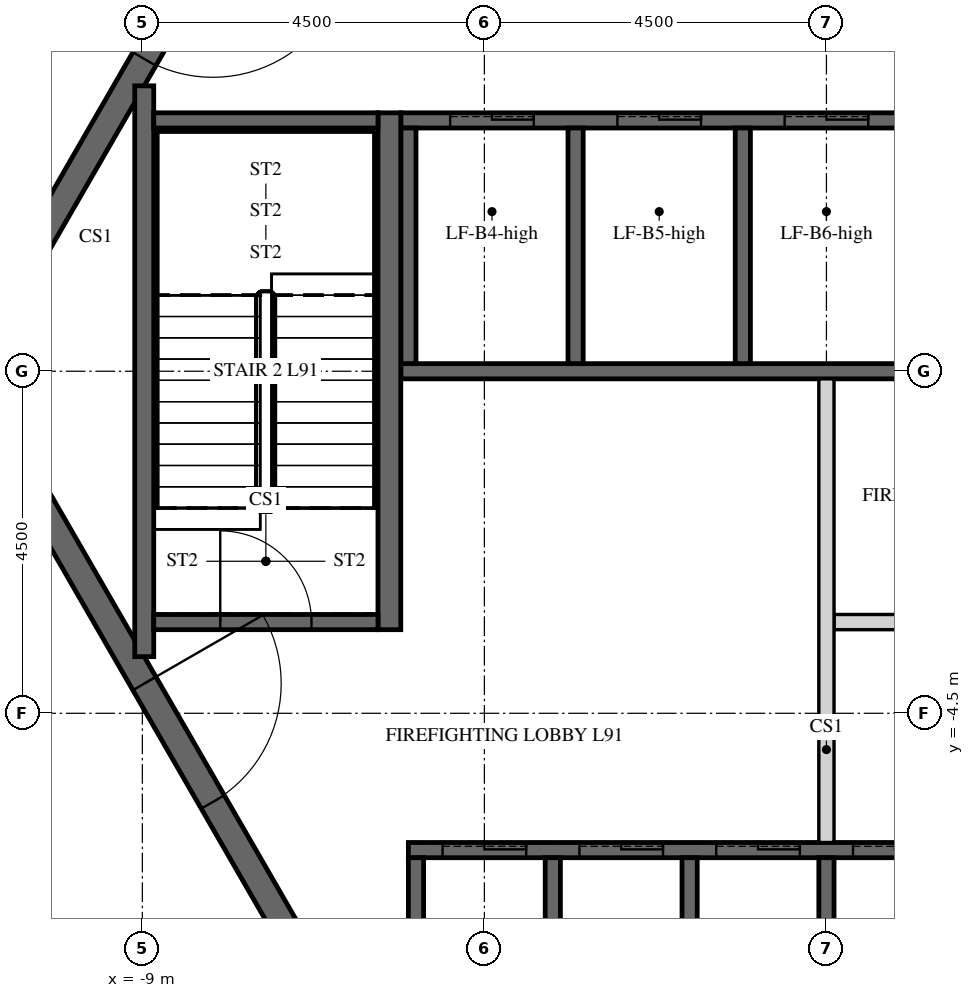
"""IFC4 building model, lengths in metres.
Left out: names, types, materials, properties, quantities, classifications, styles, units other than length and angle.
Written with IfcOpenShell. Run it as: python <this file> out.ifc"""

import sys

from ifc_helpers import new_model, si_unit, direction, frame, frame_2d, origin, place, context, subcontext, project, spatial, polyline, rectangle, outline, extrude, element, fill, save


model = new_model("IFC4")
c1 = context("Model", 3, precision=1e-05, world=origin(), true_north=direction((0.0, 1.0)))
c2 = subcontext(c1, "Body", "Model", "MODEL_VIEW")
j1 = project(units=[si_unit("LENGTHUNIT", "METRE"), si_unit("PLANEANGLEUNIT", "RADIAN")], contexts=[c1])
p1 = place(None, origin())
s1 = spatial("IfcSite", under=j1, at=p1, CompositionType="ELEMENT")
p2 = place(p1, origin())
s2 = spatial("IfcBuilding", under=s1, at=p2, CompositionType="ELEMENT")
p3 = place(p2, frame((0.0, 0.0, 376.8)))
s3 = spatial("IfcBuildingStorey", under=s2, at=p3, CompositionType="ELEMENT", Elevation=376.8)
p4 = place(p3, frame((-5.673, 9.825, -0.5), z_axis=(0.0, 0.0, 1.0), x_axis=(-0.499995046907, -0.866028263435, 0.0)))
e1 = element("IfcWall", 1, at=p4, inside=s3, PredefinedType="SHEAR", context=c2, shape_type="SweptSolid", body=[
    extrude(outline(polyline([(-0.101, -0.175), (11.446, -0.175), (11.244, 0.175), (0.101, 0.175), (-0.101, -0.175)])), origin(), (0.0, 0.0, 1.0), 11.7),
])
p5 = place(p4, frame((4.801, 0.0, 0.5)))
e2 = element("IfcOpeningElement", 2, at=p5, cuts=e1, PredefinedType="OPENING", context=c2, shape_type="SweptSolid", body=[
    extrude(rectangle(XDim=1.8, YDim=2.4, at=frame_2d((0.9, 1.2))), frame((0.0, 0.185, 0.0), z_axis=(0.0, -1.0, 0.0), x_axis=(1.0, 0.0, 0.0)), (0.0, 0.0, 1.0), 0.37),
])
p6 = place(p3, frame((-11.345, 0.0, -0.5), z_axis=(0.0, 0.0, 1.0), x_axis=(0.499995046907, -0.866028263435, 0.0)))
e3 = element("IfcWall", 3, at=p6, inside=s3, PredefinedType="SHEAR", context=c2, shape_type="SweptSolid", body=[
    extrude(outline(polyline([(-0.101, -0.175), (11.446, -0.175), (11.244, 0.175), (0.101, 0.175), (-0.101, -0.175)])), origin(), (0.0, 0.0, 1.0), 11.7),
])
p7 = place(p6, frame((4.744, 0.0, 0.5)))
e4 = element("IfcOpeningElement", 4, at=p7, cuts=e3, PredefinedType="OPENING", context=c2, shape_type="SweptSolid", body=[
    extrude(rectangle(XDim=1.8, YDim=2.4, at=frame_2d((0.9, 1.2))), frame((0.0, 0.185, 0.0), z_axis=(0.0, -1.0, 0.0), x_axis=(1.0, 0.0, 0.0)), (0.0, 0.0, 1.0), 0.37),
])
p8 = place(p3, frame((-5.6, 3.3, -0.25), z_axis=(0.0, 0.0, 1.0), x_axis=(1.0, 0.0, 0.0)))
e5 = element("IfcWall", 5, at=p8, inside=s3, PredefinedType="SHEAR", context=c2, shape_type="SweptSolid", body=[
    extrude(rectangle(XDim=11.2, YDim=0.2, at=frame_2d((5.6, 0.0))), origin(), (0.0, 0.0, 1.0), 11.45),
])
p9 = place(p8, frame((8.45, 0.0, 0.25)))
e6 = element("IfcOpeningElement", 6, at=p9, cuts=e5, PredefinedType="OPENING", context=c2, shape_type="SweptSolid", body=[
    extrude(rectangle(XDim=0.9, YDim=2.1, at=frame_2d((0.45, 1.05))), frame((0.0, 0.11, 0.0), z_axis=(0.0, -1.0, 0.0), x_axis=(1.0, 0.0, 0.0)), (0.0, 0.0, 1.0), 0.22),
])
p10 = place(p8, frame((0.65, 0.0, 0.25)))
e7 = element("IfcOpeningElement", 7, at=p10, cuts=e5, PredefinedType="OPENING", context=c2, shape_type="SweptSolid", body=[
    extrude(rectangle(XDim=1.1, YDim=2.1, at=frame_2d((0.55, 1.05))), frame((0.0, 0.11, 0.0), z_axis=(0.0, -1.0, 0.0), x_axis=(1.0, 0.0, 0.0)), (0.0, 0.0, 1.0), 0.22),
])
p11 = place(p8, frame((2.85, 0.0, 0.25)))
e8 = element("IfcOpeningElement", 8, at=p11, cuts=e5, PredefinedType="OPENING", context=c2, shape_type="SweptSolid", body=[
    extrude(rectangle(XDim=1.1, YDim=2.1, at=frame_2d((0.55, 1.05))), frame((0.0, 0.11, 0.0), z_axis=(0.0, -1.0, 0.0), x_axis=(1.0, 0.0, 0.0)), (0.0, 0.0, 1.0), 0.22),
])
p12 = place(p8, frame((5.05, 0.0, 0.25)))
e9 = element("IfcOpeningElement", 9, at=p12, cuts=e5, PredefinedType="OPENING", context=c2, shape_type="SweptSolid", body=[
    extrude(rectangle(XDim=1.1, YDim=2.1, at=frame_2d((0.55, 1.05))), frame((0.0, 0.11, 0.0), z_axis=(0.0, -1.0, 0.0), x_axis=(1.0, 0.0, 0.0)), (0.0, 0.0, 1.0), 0.22),
])
p13 = place(p3, frame((-5.6, 0.0, -0.25), z_axis=(0.0, 0.0, 1.0), x_axis=(1.0, 0.0, 0.0)))
e10 = element("IfcWall", 10, at=p13, inside=s3, PredefinedType="SHEAR", context=c2, shape_type="SweptSolid", body=[
    extrude(rectangle(XDim=11.2, YDim=0.2, at=frame_2d((5.6, 0.0))), origin(), (0.0, 0.0, 1.0), 11.45),
])
for number, where, z_axis, x_axis in (
    (11, (-5.5, 0.1, -0.25), (0.0, 0.0, 1.0), (0.0, 1.0, 0.0)),
    (12, (-3.3, 0.1, -0.25), (0.0, 0.0, 1.0), (0.0, 1.0, 0.0)),
    (13, (-1.1, 0.1, -0.25), (0.0, 0.0, 1.0), (0.0, 1.0, 0.0)),
):
    element("IfcWall", number, at=place(p3, frame(where, z_axis=z_axis, x_axis=x_axis)), inside=s3, PredefinedType="SHEAR", context=c2, shape_type="SweptSolid", body=[
        extrude(rectangle(XDim=3.1, YDim=0.2, at=frame_2d((1.55, 0.0))), origin(), (0.0, 0.0, 1.0), 11.45),
    ])
p14 = place(p3, frame((-5.5, -6.3, -0.25), z_axis=(0.0, 0.0, 1.0), x_axis=(1.0, 0.0, 0.0)))
e14 = element("IfcWall", 14, at=p14, inside=s3, PredefinedType="SHEAR", context=c2, shape_type="SweptSolid", body=[
    extrude(rectangle(XDim=9.2, YDim=0.2, at=frame_2d((4.6, 0.0))), origin(), (0.0, 0.0, 1.0), 11.45),
])
p15 = place(p14, frame((0.45, 0.0, 0.25)))
e15 = element("IfcOpeningElement", 15, at=p15, cuts=e14, PredefinedType="OPENING", context=c2, shape_type="SweptSolid", body=[
    extrude(rectangle(XDim=1.1, YDim=2.1, at=frame_2d((0.55, 1.05))), frame((0.0, 0.11, 0.0), z_axis=(0.0, -1.0, 0.0), x_axis=(1.0, 0.0, 0.0)), (0.0, 0.0, 1.0), 0.22),
])
p16 = place(p14, frame((2.25, 0.0, 0.25)))
e16 = element("IfcOpeningElement", 16, at=p16, cuts=e14, PredefinedType="OPENING", context=c2, shape_type="SweptSolid", body=[
    extrude(rectangle(XDim=1.1, YDim=2.1, at=frame_2d((0.55, 1.05))), frame((0.0, 0.11, 0.0), z_axis=(0.0, -1.0, 0.0), x_axis=(1.0, 0.0, 0.0)), (0.0, 0.0, 1.0), 0.22),
])
p17 = place(p14, frame((4.05, 0.0, 0.25)))
e17 = element("IfcOpeningElement", 17, at=p17, cuts=e14, PredefinedType="OPENING", context=c2, shape_type="SweptSolid", body=[
    extrude(rectangle(XDim=1.1, YDim=2.1, at=frame_2d((0.55, 1.05))), frame((0.0, 0.11, 0.0), z_axis=(0.0, -1.0, 0.0), x_axis=(1.0, 0.0, 0.0)), (0.0, 0.0, 1.0), 0.22),
])
p18 = place(p14, frame((5.85, 0.0, 0.25)))
e18 = element("IfcOpeningElement", 18, at=p18, cuts=e14, PredefinedType="OPENING", context=c2, shape_type="SweptSolid", body=[
    extrude(rectangle(XDim=1.1, YDim=2.1, at=frame_2d((0.55, 1.05))), frame((0.0, 0.11, 0.0), z_axis=(0.0, -1.0, 0.0), x_axis=(1.0, 0.0, 0.0)), (0.0, 0.0, 1.0), 0.22),
])
p19 = place(p14, frame((7.65, 0.0, 0.25)))
e19 = element("IfcOpeningElement", 19, at=p19, cuts=e14, PredefinedType="OPENING", context=c2, shape_type="SweptSolid", body=[
    extrude(rectangle(XDim=1.1, YDim=2.1, at=frame_2d((0.55, 1.05))), frame((0.0, 0.11, 0.0), z_axis=(0.0, -1.0, 0.0), x_axis=(1.0, 0.0, 0.0)), (0.0, 0.0, 1.0), 0.22),
])
for number, where, z_axis, x_axis in (
    (20, (-5.4, -9.3, -0.25), (0.0, 0.0, 1.0), (0.0, 1.0, 0.0)),
    (21, (-3.6, -9.3, -0.25), (0.0, 0.0, 1.0), (0.0, 1.0, 0.0)),
    (22, (-1.8, -9.3, -0.25), (0.0, 0.0, 1.0), (0.0, 1.0, 0.0)),
    (23, (0.0, -9.3, -0.25), (0.0, 0.0, 1.0), (0.0, 1.0, 0.0)),
):
    element("IfcWall", number, at=place(p3, frame(where, z_axis=z_axis, x_axis=x_axis)), inside=s3, PredefinedType="SHEAR", context=c2, shape_type="SweptSolid", body=[
        extrude(rectangle(XDim=2.9, YDim=0.2, at=frame_2d((1.45, 0.0))), origin(), (0.0, 0.0, 1.0), 11.45),
    ])
p20 = place(p3, frame((0.1, -3.3, 0.0), z_axis=(0.0, 0.0, 1.0), x_axis=(1.0, 0.0, 0.0)))
e24 = element("IfcWall", 24, at=p20, inside=s3, PredefinedType="PARTITIONING", context=c2, shape_type="SweptSolid", body=[
    extrude(rectangle(XDim=5.5, YDim=0.2, at=frame_2d((2.75, 0.0))), origin(), (0.0, 0.0, 1.0), 11.2),
])
p21 = place(p20, frame((2.3, 0.0, 0.0)))
e25 = element("IfcOpeningElement", 25, at=p21, cuts=e24, PredefinedType="OPENING", context=c2, shape_type="SweptSolid", body=[
    extrude(rectangle(XDim=0.9, YDim=2.1, at=frame_2d((0.45, 1.05))), frame((0.0, 0.11, 0.0), z_axis=(0.0, -1.0, 0.0), x_axis=(1.0, 0.0, 0.0)), (0.0, 0.0, 1.0), 0.22),
])
p22 = place(p3, frame((0.0, -6.2, 0.0), z_axis=(0.0, 0.0, 1.0), x_axis=(0.0, 1.0, 0.0)))
e26 = element("IfcWall", 26, at=p22, inside=s3, PredefinedType="PARTITIONING", context=c2, shape_type="SweptSolid", body=[
    extrude(rectangle(XDim=6.1, YDim=0.2, at=frame_2d((3.05, 0.0))), origin(), (0.0, 0.0, 1.0), 11.2),
])
p23 = place(p3, frame((-5.75, -3.4, -0.25), z_axis=(0.0, 0.0, 1.0), x_axis=(0.0, 1.0, 0.0)))
e27 = element("IfcWall", 27, at=p23, inside=s3, PredefinedType="SHEAR", context=c2, shape_type="SweptSolid", body=[
    extrude(rectangle(XDim=6.8, YDim=0.3, at=frame_2d((3.4, 0.0))), origin(), (0.0, 0.0, 1.0), 11.45),
])
p24 = place(p3, frame((-8.975, -3.755, -0.25), z_axis=(0.0, 0.0, 1.0), x_axis=(0.0, 1.0, 0.0)))
e28 = element("IfcWall", 28, at=p24, inside=s3, PredefinedType="SHEAR", context=c2, shape_type="SweptSolid", body=[
    extrude(rectangle(XDim=7.51, YDim=0.25, at=frame_2d((3.755, 0.0))), origin(), (0.0, 0.0, 1.0), 11.45),
])
p25 = place(p3, frame((-8.85, 3.3, -0.25), z_axis=(0.0, 0.0, 1.0), x_axis=(1.0, 0.0, 0.0)))
e29 = element("IfcWall", 29, at=p25, inside=s3, PredefinedType="SHEAR", context=c2, shape_type="SweptSolid", body=[
    extrude(rectangle(XDim=2.95, YDim=0.2, at=frame_2d((1.475, 0.0))), origin(), (0.0, 0.0, 1.0), 11.45),
])
p26 = place(p3, frame((-8.85, -3.3, -0.25), z_axis=(0.0, 0.0, 1.0), x_axis=(1.0, 0.0, 0.0)))
e30 = element("IfcWall", 30, at=p26, inside=s3, PredefinedType="SHEAR", context=c2, shape_type="SweptSolid", body=[
    extrude(rectangle(XDim=2.95, YDim=0.2, at=frame_2d((1.475, 0.0))), origin(), (0.0, 0.0, 1.0), 11.45),
])
p27 = place(p26, frame((0.875, 0.0, 0.25)))
e31 = element("IfcOpeningElement", 31, at=p27, cuts=e30, PredefinedType="OPENING", context=c2, shape_type="SweptSolid", body=[
    extrude(rectangle(XDim=1.2, YDim=2.4, at=frame_2d((0.6, 1.2))), frame((0.0, 0.11, 0.0), z_axis=(0.0, -1.0, 0.0), x_axis=(1.0, 0.0, 0.0)), (0.0, 0.0, 1.0), 0.22),
])
p28 = place(p3, frame((-10.046, -17.4, 0.0), z_axis=(0.0, 0.0, 1.0), x_axis=(-0.500011106667, 0.866018991252, 0.0)))
e32 = element("IfcWall", 32, at=p28, inside=s3, PredefinedType="PARTITIONING", context=c2, shape_type="SweptSolid", body=[
    extrude(rectangle(XDim=19.89, YDim=0.15, at=frame_2d((9.945, 0.0))), origin(), (0.0, 0.0, 1.0), 11.2),
])
p29 = place(p28, frame((9.045, 0.0, 0.0)))
e33 = element("IfcOpeningElement", 33, at=p29, cuts=e32, PredefinedType="OPENING", context=c2, shape_type="SweptSolid", body=[
    extrude(rectangle(XDim=1.8, YDim=2.1, at=frame_2d((0.9, 1.05))), frame((0.0, 0.085, 0.0), z_axis=(0.0, -1.0, 0.0), x_axis=(1.0, 0.0, 0.0)), (0.0, 0.0, 1.0), 0.17),
])
p30 = place(p3, frame((-19.991, 0.175, 0.0), z_axis=(0.0, 0.0, 1.0), x_axis=(0.500011106667, 0.866018991252, 0.0)))
e34 = element("IfcWall", 34, at=p30, inside=s3, PredefinedType="PARTITIONING", context=c2, shape_type="SweptSolid", body=[
    extrude(rectangle(XDim=19.89, YDim=0.15, at=frame_2d((9.945, 0.0))), origin(), (0.0, 0.0, 1.0), 11.2),
])
p31 = place(p30, frame((9.045, 0.0, 0.0)))
e35 = element("IfcOpeningElement", 35, at=p31, cuts=e34, PredefinedType="OPENING", context=c2, shape_type="SweptSolid", body=[
    extrude(rectangle(XDim=1.8, YDim=2.1, at=frame_2d((0.9, 1.05))), frame((0.0, 0.085, 0.0), z_axis=(0.0, -1.0, 0.0), x_axis=(1.0, 0.0, 0.0)), (0.0, 0.0, 1.0), 0.17),
])
p32 = place(p5, origin())
e36 = element("IfcDoor", 36, at=p32, inside=s3, OperationType="DOUBLE_DOOR_SINGLE_SWING", PredefinedType="DOOR", context=c2, shape_type="SweptSolid", body=[
    extrude(rectangle(XDim=1.8, YDim=2.4, at=frame_2d((0.9, 1.2))), frame((0.0, 0.025, 0.0), z_axis=(0.0, -1.0, 0.0), x_axis=(1.0, 0.0, 0.0)), (0.0, 0.0, 1.0), 0.05),
])
fill(e2, e36)
p33 = place(p7, origin())
e37 = element("IfcDoor", 37, at=p33, inside=s3, OperationType="DOUBLE_DOOR_SINGLE_SWING", PredefinedType="DOOR", context=c2, shape_type="SweptSolid", body=[
    extrude(rectangle(XDim=1.8, YDim=2.4, at=frame_2d((0.9, 1.2))), frame((0.0, 0.025, 0.0), z_axis=(0.0, -1.0, 0.0), x_axis=(1.0, 0.0, 0.0)), (0.0, 0.0, 1.0), 0.05),
])
fill(e4, e37)
p34 = place(p27, origin())
e38 = element("IfcDoor", 38, at=p34, inside=s3, OperationType="SINGLE_SWING_LEFT", PredefinedType="DOOR", context=c2, shape_type="SweptSolid", body=[
    extrude(rectangle(XDim=1.2, YDim=2.4, at=frame_2d((0.6, 1.2))), frame((0.0, 0.025, 0.0), z_axis=(0.0, -1.0, 0.0), x_axis=(1.0, 0.0, 0.0)), (0.0, 0.0, 1.0), 0.05),
])
fill(e31, e38)
p35 = place(p10, origin())
e39 = element("IfcDoor", 39, at=p35, inside=s3, OperationType="SLIDING_TO_LEFT", PredefinedType="DOOR", context=c2, shape_type="SweptSolid", body=[
    extrude(rectangle(XDim=1.1, YDim=2.1, at=frame_2d((0.55, 1.05))), frame((0.0, 0.025, 0.0), z_axis=(0.0, -1.0, 0.0), x_axis=(1.0, 0.0, 0.0)), (0.0, 0.0, 1.0), 0.05),
])
fill(e7, e39)
p36 = place(p11, origin())
e40 = element("IfcDoor", 40, at=p36, inside=s3, OperationType="SLIDING_TO_LEFT", PredefinedType="DOOR", context=c2, shape_type="SweptSolid", body=[
    extrude(rectangle(XDim=1.1, YDim=2.1, at=frame_2d((0.55, 1.05))), frame((0.0, 0.025, 0.0), z_axis=(0.0, -1.0, 0.0), x_axis=(1.0, 0.0, 0.0)), (0.0, 0.0, 1.0), 0.05),
])
fill(e8, e40)
p37 = place(p12, origin())
e41 = element("IfcDoor", 41, at=p37, inside=s3, OperationType="SLIDING_TO_LEFT", PredefinedType="DOOR", context=c2, shape_type="SweptSolid", body=[
    extrude(rectangle(XDim=1.1, YDim=2.1, at=frame_2d((0.55, 1.05))), frame((0.0, 0.025, 0.0), z_axis=(0.0, -1.0, 0.0), x_axis=(1.0, 0.0, 0.0)), (0.0, 0.0, 1.0), 0.05),
])
fill(e9, e41)
p38 = place(p15, origin())
e42 = element("IfcDoor", 42, at=p38, inside=s3, OperationType="SLIDING_TO_LEFT", PredefinedType="DOOR", context=c2, shape_type="SweptSolid", body=[
    extrude(rectangle(XDim=1.1, YDim=2.1, at=frame_2d((0.55, 1.05))), frame((0.0, 0.025, 0.0), z_axis=(0.0, -1.0, 0.0), x_axis=(1.0, 0.0, 0.0)), (0.0, 0.0, 1.0), 0.05),
])
fill(e15, e42)
p39 = place(p16, origin())
e43 = element("IfcDoor", 43, at=p39, inside=s3, OperationType="SLIDING_TO_LEFT", PredefinedType="DOOR", context=c2, shape_type="SweptSolid", body=[
    extrude(rectangle(XDim=1.1, YDim=2.1, at=frame_2d((0.55, 1.05))), frame((0.0, 0.025, 0.0), z_axis=(0.0, -1.0, 0.0), x_axis=(1.0, 0.0, 0.0)), (0.0, 0.0, 1.0), 0.05),
])
fill(e16, e43)
p40 = place(p17, origin())
e44 = element("IfcDoor", 44, at=p40, inside=s3, OperationType="SLIDING_TO_LEFT", PredefinedType="DOOR", context=c2, shape_type="SweptSolid", body=[
    extrude(rectangle(XDim=1.1, YDim=2.1, at=frame_2d((0.55, 1.05))), frame((0.0, 0.025, 0.0), z_axis=(0.0, -1.0, 0.0), x_axis=(1.0, 0.0, 0.0)), (0.0, 0.0, 1.0), 0.05),
])
fill(e17, e44)
p41 = place(p18, origin())
e45 = element("IfcDoor", 45, at=p41, inside=s3, OperationType="SLIDING_TO_LEFT", PredefinedType="DOOR", context=c2, shape_type="SweptSolid", body=[
    extrude(rectangle(XDim=1.1, YDim=2.1, at=frame_2d((0.55, 1.05))), frame((0.0, 0.025, 0.0), z_axis=(0.0, -1.0, 0.0), x_axis=(1.0, 0.0, 0.0)), (0.0, 0.0, 1.0), 0.05),
])
fill(e18, e45)
save(model, sys.argv[1])
